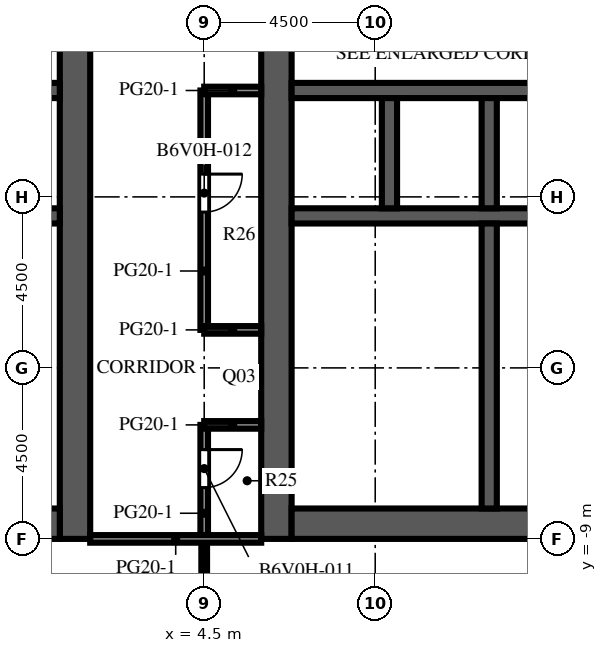
"""IFC4 building model, lengths in metres.
Left out: names, types, materials, properties, quantities, classifications, styles, units other than length and angle.
Written with IfcOpenShell. Run it as: python <this file> out.ifc"""

import sys

from ifc_helpers import new_model, si_unit, direction, frame, frame_2d, origin, place, context, subcontext, project, spatial, rectangle, extrude, element, fill, save


model = new_model("IFC4")
c1 = context("Model", 3, precision=1e-05, world=origin(), true_north=direction((0.0, 1.0)))
c2 = subcontext(c1, "Body", "Model", "MODEL_VIEW")
j1 = project(units=[si_unit("LENGTHUNIT", "METRE"), si_unit("PLANEANGLEUNIT", "RADIAN")], contexts=[c1])
p1 = place(None, origin())
s1 = spatial("IfcSite", under=j1, at=p1, CompositionType="ELEMENT")
p2 = place(p1, origin())
s2 = spatial("IfcBuilding", under=s1, at=p2, CompositionType="ELEMENT")
p3 = place(p2, frame((0.0, 0.0, 191.5)))
s3 = spatial("IfcBuildingStorey", under=s2, at=p3, CompositionType="ELEMENT", Elevation=191.5)
p4 = place(p3, frame((1.1, -9.0, 0.0), z_axis=(0.0, 0.0, 1.0), x_axis=(0.0, 1.0, 0.0)))
e1 = element("IfcWall", 1, at=p4, inside=s3, PredefinedType="SHEAR", context=c2, shape_type="SweptSolid", body=[
    extrude(rectangle(XDim=27.5, YDim=0.8, at=frame_2d((13.75, 0.0))), origin(), (0.0, 0.0, 1.0), 4.1),
])
p5 = place(p4, frame((12.55, 0.0, 0.0)))
e2 = element("IfcOpeningElement", 2, at=p5, cuts=e1, PredefinedType="OPENING", context=c2, shape_type="SweptSolid", body=[
    extrude(rectangle(XDim=2.4, YDim=2.4, at=frame_2d((1.2, 1.2))), frame((0.0, 0.41, 0.0), z_axis=(0.0, -1.0, 0.0), x_axis=(1.0, 0.0, 0.0)), (0.0, 0.0, 1.0), 0.82),
])
p6 = place(p4, frame((3.95, 0.0, 0.0)))
e3 = element("IfcOpeningElement", 3, at=p6, cuts=e1, PredefinedType="OPENING", context=c2, shape_type="SweptSolid", body=[
    extrude(rectangle(XDim=1.2, YDim=2.1, at=frame_2d((0.6, 1.05))), frame((0.0, 0.41, 0.0), z_axis=(0.0, -1.0, 0.0), x_axis=(1.0, 0.0, 0.0)), (0.0, 0.0, 1.0), 0.82),
])
p7 = place(p4, frame((19.45, 0.0, 0.0)))
e4 = element("IfcOpeningElement", 4, at=p7, cuts=e1, PredefinedType="OPENING", context=c2, shape_type="SweptSolid", body=[
    extrude(rectangle(XDim=1.0, YDim=2.1, at=frame_2d((0.5, 1.05))), frame((0.0, 0.41, 0.0), z_axis=(0.0, -1.0, 0.0), x_axis=(1.0, 0.0, 0.0)), (0.0, 0.0, 1.0), 0.82),
])
p8 = place(p4, frame((21.137, 0.0, 0.0)))
e5 = element("IfcOpeningElement", 5, at=p8, cuts=e1, PredefinedType="OPENING", context=c2, shape_type="SweptSolid", body=[
    extrude(rectangle(XDim=1.0, YDim=2.1, at=frame_2d((0.5, 1.05))), frame((0.0, 0.41, 0.0), z_axis=(0.0, -1.0, 0.0), x_axis=(1.0, 0.0, 0.0)), (0.0, 0.0, 1.0), 0.82),
])
p9 = place(p4, frame((23.2, 0.0, 0.0)))
e6 = element("IfcOpeningElement", 6, at=p9, cuts=e1, PredefinedType="OPENING", context=c2, shape_type="SweptSolid", body=[
    extrude(rectangle(XDim=1.0, YDim=2.1, at=frame_2d((0.5, 1.05))), frame((0.0, 0.41, 0.0), z_axis=(0.0, -1.0, 0.0), x_axis=(1.0, 0.0, 0.0)), (0.0, 0.0, 1.0), 0.82),
])
p10 = place(p4, frame((25.262, 0.0, 0.0)))
e7 = element("IfcOpeningElement", 7, at=p10, cuts=e1, PredefinedType="OPENING", context=c2, shape_type="SweptSolid", body=[
    extrude(rectangle(XDim=1.0, YDim=2.1, at=frame_2d((0.5, 1.05))), frame((0.0, 0.41, 0.0), z_axis=(0.0, -1.0, 0.0), x_axis=(1.0, 0.0, 0.0)), (0.0, 0.0, 1.0), 0.82),
])
p11 = place(p3, frame((-9.7, -8.6, 0.0), z_axis=(0.0, 0.0, 1.0), x_axis=(1.0, 0.0, 0.0)))
e8 = element("IfcWall", 8, at=p11, inside=s3, PredefinedType="SHEAR", context=c2, shape_type="SweptSolid", body=[
    extrude(rectangle(XDim=10.4, YDim=0.8, at=frame_2d((5.2, 0.0))), origin(), (0.0, 0.0, 1.0), 4.1),
])
p12 = place(p3, frame((-9.7, -0.5, 0.0), z_axis=(0.0, 0.0, 1.0), x_axis=(1.0, 0.0, 0.0)))
e9 = element("IfcWall", 9, at=p12, inside=s3, PredefinedType="SHEAR", context=c2, shape_type="SweptSolid", body=[
    extrude(rectangle(XDim=10.4, YDim=0.4, at=frame_2d((5.2, 0.0))), origin(), (0.0, 0.0, 1.0), 4.1),
])
p13 = place(p3, frame((-9.7, 2.8, 0.0), z_axis=(0.0, 0.0, 1.0), x_axis=(1.0, 0.0, 0.0)))
e10 = element("IfcWall", 10, at=p13, inside=s3, PredefinedType="SHEAR", context=c2, shape_type="SweptSolid", body=[
    extrude(rectangle(XDim=10.4, YDim=0.4, at=frame_2d((5.2, 0.0))), origin(), (0.0, 0.0, 1.0), 4.1),
])
p14 = place(p13, frame((0.738, 0.0, 0.0)))
e11 = element("IfcOpeningElement", 11, at=p14, cuts=e10, PredefinedType="OPENING", context=c2, shape_type="SweptSolid", body=[
    extrude(rectangle(XDim=1.1, YDim=2.1, at=frame_2d((0.55, 1.05))), frame((0.0, 0.21, 0.0), z_axis=(0.0, -1.0, 0.0), x_axis=(1.0, 0.0, 0.0)), (0.0, 0.0, 1.0), 0.42),
])
p15 = place(p13, frame((3.337, 0.0, 0.0)))
e12 = element("IfcOpeningElement", 12, at=p15, cuts=e10, PredefinedType="OPENING", context=c2, shape_type="SweptSolid", body=[
    extrude(rectangle(XDim=1.1, YDim=2.1, at=frame_2d((0.55, 1.05))), frame((0.0, 0.21, 0.0), z_axis=(0.0, -1.0, 0.0), x_axis=(1.0, 0.0, 0.0)), (0.0, 0.0, 1.0), 0.42),
])
p16 = place(p13, frame((6.012, 0.0, 0.0)))
e13 = element("IfcOpeningElement", 13, at=p16, cuts=e10, PredefinedType="OPENING", context=c2, shape_type="SweptSolid", body=[
    extrude(rectangle(XDim=1.0, YDim=2.1, at=frame_2d((0.5, 1.05))), frame((0.0, 0.21, 0.0), z_axis=(0.0, -1.0, 0.0), x_axis=(1.0, 0.0, 0.0)), (0.0, 0.0, 1.0), 0.42),
])
p17 = place(p13, frame((8.613, 0.0, 0.0)))
e14 = element("IfcOpeningElement", 14, at=p17, cuts=e10, PredefinedType="OPENING", context=c2, shape_type="SweptSolid", body=[
    extrude(rectangle(XDim=1.0, YDim=2.1, at=frame_2d((0.5, 1.05))), frame((0.0, 0.21, 0.0), z_axis=(0.0, -1.0, 0.0), x_axis=(1.0, 0.0, 0.0)), (0.0, 0.0, 1.0), 0.42),
])
p18 = place(p3, frame((6.4, -9.0, 0.0), z_axis=(0.0, 0.0, 1.0), x_axis=(0.0, 1.0, 0.0)))
e15 = element("IfcWall", 15, at=p18, inside=s3, PredefinedType="SHEAR", context=c2, shape_type="SweptSolid", body=[
    extrude(rectangle(XDim=27.5, YDim=0.8, at=frame_2d((13.75, 0.0))), origin(), (0.0, 0.0, 1.0), 4.1),
])
p19 = place(p18, frame((12.55, 0.0, 0.0)))
e16 = element("IfcOpeningElement", 16, at=p19, cuts=e15, PredefinedType="OPENING", context=c2, shape_type="SweptSolid", body=[
    extrude(rectangle(XDim=2.4, YDim=2.4, at=frame_2d((1.2, 1.2))), frame((0.0, 0.41, 0.0), z_axis=(0.0, -1.0, 0.0), x_axis=(1.0, 0.0, 0.0)), (0.0, 0.0, 1.0), 0.82),
])
p20 = place(p18, frame((3.95, 0.0, 0.0)))
e17 = element("IfcOpeningElement", 17, at=p20, cuts=e15, PredefinedType="OPENING", context=c2, shape_type="SweptSolid", body=[
    extrude(rectangle(XDim=1.2, YDim=2.1, at=frame_2d((0.6, 1.05))), frame((0.0, 0.41, 0.0), z_axis=(0.0, -1.0, 0.0), x_axis=(1.0, 0.0, 0.0)), (0.0, 0.0, 1.0), 0.82),
])
p21 = place(p18, frame((19.45, 0.0, 0.0)))
e18 = element("IfcOpeningElement", 18, at=p21, cuts=e15, PredefinedType="OPENING", context=c2, shape_type="SweptSolid", body=[
    extrude(rectangle(XDim=1.0, YDim=2.1, at=frame_2d((0.5, 1.05))), frame((0.0, 0.41, 0.0), z_axis=(0.0, -1.0, 0.0), x_axis=(1.0, 0.0, 0.0)), (0.0, 0.0, 1.0), 0.82),
])
p22 = place(p18, frame((21.137, 0.0, 0.0)))
e19 = element("IfcOpeningElement", 19, at=p22, cuts=e15, PredefinedType="OPENING", context=c2, shape_type="SweptSolid", body=[
    extrude(rectangle(XDim=1.0, YDim=2.1, at=frame_2d((0.5, 1.05))), frame((0.0, 0.41, 0.0), z_axis=(0.0, -1.0, 0.0), x_axis=(1.0, 0.0, 0.0)), (0.0, 0.0, 1.0), 0.82),
])
p23 = place(p18, frame((23.2, 0.0, 0.0)))
e20 = element("IfcOpeningElement", 20, at=p23, cuts=e15, PredefinedType="OPENING", context=c2, shape_type="SweptSolid", body=[
    extrude(rectangle(XDim=1.0, YDim=2.1, at=frame_2d((0.5, 1.05))), frame((0.0, 0.41, 0.0), z_axis=(0.0, -1.0, 0.0), x_axis=(1.0, 0.0, 0.0)), (0.0, 0.0, 1.0), 0.82),
])
p24 = place(p18, frame((25.262, 0.0, 0.0)))
e21 = element("IfcOpeningElement", 21, at=p24, cuts=e15, PredefinedType="OPENING", context=c2, shape_type="SweptSolid", body=[
    extrude(rectangle(XDim=1.0, YDim=2.1, at=frame_2d((0.5, 1.05))), frame((0.0, 0.41, 0.0), z_axis=(0.0, -1.0, 0.0), x_axis=(1.0, 0.0, 0.0)), (0.0, 0.0, 1.0), 0.82),
])
p25 = place(p3, frame((6.8, -8.6, 0.0), z_axis=(0.0, 0.0, 1.0), x_axis=(1.0, 0.0, 0.0)))
e22 = element("IfcWall", 22, at=p25, inside=s3, PredefinedType="SHEAR", context=c2, shape_type="SweptSolid", body=[
    extrude(rectangle(XDim=10.4, YDim=0.8, at=frame_2d((5.2, 0.0))), origin(), (0.0, 0.0, 1.0), 4.1),
])
p26 = place(p3, frame((6.8, -0.5, 0.0), z_axis=(0.0, 0.0, 1.0), x_axis=(1.0, 0.0, 0.0)))
e23 = element("IfcWall", 23, at=p26, inside=s3, PredefinedType="SHEAR", context=c2, shape_type="SweptSolid", body=[
    extrude(rectangle(XDim=10.4, YDim=0.4, at=frame_2d((5.2, 0.0))), origin(), (0.0, 0.0, 1.0), 4.1),
])
p27 = place(p3, frame((6.8, 2.8, 0.0), z_axis=(0.0, 0.0, 1.0), x_axis=(1.0, 0.0, 0.0)))
e24 = element("IfcWall", 24, at=p27, inside=s3, PredefinedType="SHEAR", context=c2, shape_type="SweptSolid", body=[
    extrude(rectangle(XDim=10.4, YDim=0.4, at=frame_2d((5.2, 0.0))), origin(), (0.0, 0.0, 1.0), 4.1),
])
p28 = place(p27, frame((0.738, 0.0, 0.0)))
e25 = element("IfcOpeningElement", 25, at=p28, cuts=e24, PredefinedType="OPENING", context=c2, shape_type="SweptSolid", body=[
    extrude(rectangle(XDim=1.1, YDim=2.1, at=frame_2d((0.55, 1.05))), frame((0.0, 0.21, 0.0), z_axis=(0.0, -1.0, 0.0), x_axis=(1.0, 0.0, 0.0)), (0.0, 0.0, 1.0), 0.42),
])
p29 = place(p27, frame((3.337, 0.0, 0.0)))
e26 = element("IfcOpeningElement", 26, at=p29, cuts=e24, PredefinedType="OPENING", context=c2, shape_type="SweptSolid", body=[
    extrude(rectangle(XDim=1.1, YDim=2.1, at=frame_2d((0.55, 1.05))), frame((0.0, 0.21, 0.0), z_axis=(0.0, -1.0, 0.0), x_axis=(1.0, 0.0, 0.0)), (0.0, 0.0, 1.0), 0.42),
])
p30 = place(p27, frame((6.012, 0.0, 0.0)))
e27 = element("IfcOpeningElement", 27, at=p30, cuts=e24, PredefinedType="OPENING", context=c2, shape_type="SweptSolid", body=[
    extrude(rectangle(XDim=1.0, YDim=2.1, at=frame_2d((0.5, 1.05))), frame((0.0, 0.21, 0.0), z_axis=(0.0, -1.0, 0.0), x_axis=(1.0, 0.0, 0.0)), (0.0, 0.0, 1.0), 0.42),
])
p31 = place(p27, frame((8.613, 0.0, 0.0)))
e28 = element("IfcOpeningElement", 28, at=p31, cuts=e24, PredefinedType="OPENING", context=c2, shape_type="SweptSolid", body=[
    extrude(rectangle(XDim=1.0, YDim=2.1, at=frame_2d((0.5, 1.05))), frame((0.0, 0.21, 0.0), z_axis=(0.0, -1.0, 0.0), x_axis=(1.0, 0.0, 0.0)), (0.0, 0.0, 1.0), 0.42),
])
for number, where, z_axis, x_axis in (
    (29, (9.375, -0.3, 0.0), (0.0, 0.0, 1.0), (0.0, 1.0, 0.0)),
    (30, (12.0, -0.3, 0.0), (0.0, 0.0, 1.0), (0.0, 1.0, 0.0)),
):
    element("IfcWall", number, at=place(p3, frame(where, z_axis=z_axis, x_axis=x_axis)), inside=s3, PredefinedType="SHEAR", context=c2, shape_type="SweptSolid", body=[
        extrude(rectangle(XDim=2.9, YDim=0.4, at=frame_2d((1.45, 0.0))), origin(), (0.0, 0.0, 1.0), 4.1),
    ])
p32 = place(p3, frame((12.0, -8.2, 0.0), z_axis=(0.0, 0.0, 1.0), x_axis=(0.0, 1.0, 0.0)))
e31 = element("IfcWall", 31, at=p32, inside=s3, PredefinedType="SHEAR", context=c2, shape_type="SweptSolid", body=[
    extrude(rectangle(XDim=7.5, YDim=0.4, at=frame_2d((3.75, 0.0))), origin(), (0.0, 0.0, 1.0), 4.1),
])
p33 = place(p3, frame((-0.9, -5.95, 0.0), z_axis=(0.0, 0.0, 1.0), x_axis=(1.0, 0.0, 0.0)))
e32 = element("IfcWall", 32, at=p33, inside=s3, PredefinedType="PARTITIONING", context=c2, shape_type="SweptSolid", body=[
    extrude(rectangle(XDim=1.6, YDim=0.1, at=frame_2d((0.8, 0.0))), origin(), (0.0, 0.0, 1.0), 3.65),
])
p34 = place(p33, frame((0.3, 0.0, 0.0)))
e33 = element("IfcOpeningElement", 33, at=p34, cuts=e32, PredefinedType="OPENING", context=c2, shape_type="SweptSolid", body=[
    extrude(rectangle(XDim=1.0, YDim=2.1, at=frame_2d((0.5, 1.05))), frame((0.0, 0.06, 0.0), z_axis=(0.0, -1.0, 0.0), x_axis=(1.0, 0.0, 0.0)), (0.0, 0.0, 1.0), 0.12),
])
p35 = place(p3, frame((-0.9, -2.95, 0.0), z_axis=(0.0, 0.0, 1.0), x_axis=(1.0, 0.0, 0.0)))
e34 = element("IfcWall", 34, at=p35, inside=s3, PredefinedType="PARTITIONING", context=c2, shape_type="SweptSolid", body=[
    extrude(rectangle(XDim=1.6, YDim=0.1, at=frame_2d((0.8, 0.0))), origin(), (0.0, 0.0, 1.0), 3.65),
])
p36 = place(p35, frame((0.3, 0.0, 0.0)))
e35 = element("IfcOpeningElement", 35, at=p36, cuts=e34, PredefinedType="OPENING", context=c2, shape_type="SweptSolid", body=[
    extrude(rectangle(XDim=1.0, YDim=2.1, at=frame_2d((0.5, 1.05))), frame((0.0, 0.06, 0.0), z_axis=(0.0, -1.0, 0.0), x_axis=(1.0, 0.0, 0.0)), (0.0, 0.0, 1.0), 0.12),
])
p37 = place(p3, frame((6.8, -5.95, 0.0), z_axis=(0.0, 0.0, 1.0), x_axis=(1.0, 0.0, 0.0)))
e36 = element("IfcWall", 36, at=p37, inside=s3, PredefinedType="PARTITIONING", context=c2, shape_type="SweptSolid", body=[
    extrude(rectangle(XDim=1.6, YDim=0.1, at=frame_2d((0.8, 0.0))), origin(), (0.0, 0.0, 1.0), 3.65),
])
p38 = place(p37, frame((0.3, 0.0, 0.0)))
e37 = element("IfcOpeningElement", 37, at=p38, cuts=e36, PredefinedType="OPENING", context=c2, shape_type="SweptSolid", body=[
    extrude(rectangle(XDim=1.0, YDim=2.1, at=frame_2d((0.5, 1.05))), frame((0.0, 0.06, 0.0), z_axis=(0.0, -1.0, 0.0), x_axis=(1.0, 0.0, 0.0)), (0.0, 0.0, 1.0), 0.12),
])
p39 = place(p3, frame((6.8, -2.95, 0.0), z_axis=(0.0, 0.0, 1.0), x_axis=(1.0, 0.0, 0.0)))
e38 = element("IfcWall", 38, at=p39, inside=s3, PredefinedType="PARTITIONING", context=c2, shape_type="SweptSolid", body=[
    extrude(rectangle(XDim=1.6, YDim=0.1, at=frame_2d((0.8, 0.0))), origin(), (0.0, 0.0, 1.0), 3.65),
])
p40 = place(p39, frame((0.3, 0.0, 0.0)))
e39 = element("IfcOpeningElement", 39, at=p40, cuts=e38, PredefinedType="OPENING", context=c2, shape_type="SweptSolid", body=[
    extrude(rectangle(XDim=1.0, YDim=2.1, at=frame_2d((0.5, 1.05))), frame((0.0, 0.06, 0.0), z_axis=(0.0, -1.0, 0.0), x_axis=(1.0, 0.0, 0.0)), (0.0, 0.0, 1.0), 0.12),
])
p41 = place(p3, frame((8.4, -5.95, 0.0), z_axis=(0.0, 0.0, 1.0), x_axis=(0.0, 1.0, 0.0)))
e40 = element("IfcWall", 40, at=p41, inside=s3, PredefinedType="PARTITIONING", context=c2, shape_type="SweptSolid", body=[
    extrude(rectangle(XDim=3.0, YDim=0.1, at=frame_2d((1.5, 0.0))), origin(), (0.0, 0.0, 1.0), 3.65),
])
p42 = place(p41, frame((1.0, 0.0, 0.0)))
e41 = element("IfcOpeningElement", 41, at=p42, cuts=e40, PredefinedType="OPENING", context=c2, shape_type="SweptSolid", body=[
    extrude(rectangle(XDim=1.0, YDim=2.1, at=frame_2d((0.5, 1.05))), frame((0.0, 0.06, 0.0), z_axis=(0.0, -1.0, 0.0), x_axis=(1.0, 0.0, 0.0)), (0.0, 0.0, 1.0), 0.12),
])
for number, where, z_axis, x_axis in (
    (42, (8.4, -5.95, 0.0), (0.0, 0.0, 1.0), (1.0, 0.0, 0.0)),
    (43, (8.4, -2.95, 0.0), (0.0, 0.0, 1.0), (1.0, 0.0, 0.0)),
):
    element("IfcWall", number, at=place(p3, frame(where, z_axis=z_axis, x_axis=x_axis)), inside=s3, PredefinedType="PARTITIONING", context=c2, shape_type="SweptSolid", body=[
        extrude(rectangle(XDim=3.4, YDim=0.1, at=frame_2d((1.7, 0.0))), origin(), (0.0, 0.0, 1.0), 3.65),
    ])
p43 = place(p3, frame((4.5, -9.0, 0.0), z_axis=(0.0, 0.0, 1.0), x_axis=(0.0, -1.0, 0.0)))
e44 = element("IfcWall", 44, at=p43, inside=s3, PredefinedType="PARTITIONING", context=c2, shape_type="SweptSolid", body=[
    extrude(rectangle(XDim=17.5, YDim=0.15, at=frame_2d((8.75, 0.0))), origin(), (0.0, 0.0, 1.0), 3.65),
])
p44 = place(p43, frame((3.9, 0.0, 0.0)))
e45 = element("IfcOpeningElement", 45, at=p44, cuts=e44, PredefinedType="OPENING", context=c2, shape_type="SweptSolid", body=[
    extrude(rectangle(XDim=1.0, YDim=2.1, at=frame_2d((0.5, 1.05))), frame((0.0, 0.085, 0.0), z_axis=(0.0, -1.0, 0.0), x_axis=(1.0, 0.0, 0.0)), (0.0, 0.0, 1.0), 0.17),
])
p45 = place(p3, frame((4.5, -6.0, 0.0), z_axis=(0.0, 0.0, 1.0), x_axis=(0.0, -1.0, 0.0)))
e46 = element("IfcWall", 46, at=p45, inside=s3, PredefinedType="PARTITIONING", context=c2, shape_type="SweptSolid", body=[
    extrude(rectangle(XDim=3.0, YDim=0.2, at=frame_2d((1.5, 0.0))), origin(), (0.0, 0.0, 1.0), 3.65),
])
p46 = place(p45, frame((0.65, 0.0, 0.0)))
e47 = element("IfcOpeningElement", 47, at=p46, cuts=e46, PredefinedType="OPENING", context=c2, shape_type="SweptSolid", body=[
    extrude(rectangle(XDim=1.0, YDim=2.1, at=frame_2d((0.5, 1.05))), frame((0.0, 0.11, 0.0), z_axis=(0.0, -1.0, 0.0), x_axis=(1.0, 0.0, 0.0)), (0.0, 0.0, 1.0), 0.22),
])
p47 = place(p3, frame((4.5, 2.8, 0.0), z_axis=(0.0, 0.0, 1.0), x_axis=(0.0, -1.0, 0.0)))
e48 = element("IfcWall", 48, at=p47, inside=s3, PredefinedType="PARTITIONING", context=c2, shape_type="SweptSolid", body=[
    extrude(rectangle(XDim=6.3, YDim=0.2, at=frame_2d((3.15, 0.0))), origin(), (0.0, 0.0, 1.0), 3.65),
])
p48 = place(p47, frame((2.2, 0.0, 0.0)))
e49 = element("IfcOpeningElement", 49, at=p48, cuts=e48, PredefinedType="OPENING", context=c2, shape_type="SweptSolid", body=[
    extrude(rectangle(XDim=1.0, YDim=2.1, at=frame_2d((0.5, 1.05))), frame((0.0, 0.11, 0.0), z_axis=(0.0, -1.0, 0.0), x_axis=(1.0, 0.0, 0.0)), (0.0, 0.0, 1.0), 0.22),
])
p49 = place(p3, frame((1.5, -9.0, 0.0), z_axis=(0.0, 0.0, 1.0), x_axis=(1.0, 0.0, 0.0)))
e50 = element("IfcWall", 50, at=p49, inside=s3, PredefinedType="PARTITIONING", context=c2, shape_type="SweptSolid", body=[
    extrude(rectangle(XDim=4.5, YDim=0.2, at=frame_2d((2.25, 0.0))), origin(), (0.0, 0.0, 1.0), 3.65),
])
for number, where, z_axis, x_axis in (
    (51, (4.5, -6.0, 0.0), (0.0, 0.0, 1.0), (1.0, 0.0, 0.0)),
    (52, (4.5, -3.5, 0.0), (0.0, 0.0, 1.0), (1.0, 0.0, 0.0)),
    (53, (4.5, 2.8, 0.0), (0.0, 0.0, 1.0), (1.0, 0.0, 0.0)),
):
    element("IfcWall", number, at=place(p3, frame(where, z_axis=z_axis, x_axis=x_axis)), inside=s3, PredefinedType="PARTITIONING", context=c2, shape_type="SweptSolid", body=[
        extrude(rectangle(XDim=1.5, YDim=0.2, at=frame_2d((0.75, 0.0))), origin(), (0.0, 0.0, 1.0), 3.65),
    ])
p50 = place(p28, origin())
e54 = element("IfcDoor", 54, at=p50, inside=s3, OperationType="DOUBLE_DOOR_SLIDING", PredefinedType="DOOR", context=c2, shape_type="SweptSolid", body=[
    extrude(rectangle(XDim=1.1, YDim=2.1, at=frame_2d((0.55, 1.05))), frame((0.0, 0.025, 0.0), z_axis=(0.0, -1.0, 0.0), x_axis=(1.0, 0.0, 0.0)), (0.0, 0.0, 1.0), 0.05),
])
fill(e25, e54)
p51 = place(p29, origin())
e55 = element("IfcDoor", 55, at=p51, inside=s3, OperationType="DOUBLE_DOOR_SLIDING", PredefinedType="DOOR", context=c2, shape_type="SweptSolid", body=[
    extrude(rectangle(XDim=1.1, YDim=2.1, at=frame_2d((0.55, 1.05))), frame((0.0, 0.025, 0.0), z_axis=(0.0, -1.0, 0.0), x_axis=(1.0, 0.0, 0.0)), (0.0, 0.0, 1.0), 0.05),
])
fill(e26, e55)
p52 = place(p5, origin())
e56 = element("IfcDoor", 56, at=p52, inside=s3, OperationType="DOUBLE_DOOR_DOUBLE_SWING", PredefinedType="DOOR", context=c2, shape_type="SweptSolid", body=[
    extrude(rectangle(XDim=2.4, YDim=2.4, at=frame_2d((1.2, 1.2))), frame((0.0, 0.025, 0.0), z_axis=(0.0, -1.0, 0.0), x_axis=(1.0, 0.0, 0.0)), (0.0, 0.0, 1.0), 0.05),
])
fill(e2, e56)
p53 = place(p19, origin())
e57 = element("IfcDoor", 57, at=p53, inside=s3, OperationType="DOUBLE_DOOR_DOUBLE_SWING", PredefinedType="DOOR", context=c2, shape_type="SweptSolid", body=[
    extrude(rectangle(XDim=2.4, YDim=2.4, at=frame_2d((1.2, 1.2))), frame((0.0, 0.025, 0.0), z_axis=(0.0, -1.0, 0.0), x_axis=(1.0, 0.0, 0.0)), (0.0, 0.0, 1.0), 0.05),
])
fill(e16, e57)
p54 = place(p6, origin())
e58 = element("IfcDoor", 58, at=p54, inside=s3, OperationType="SINGLE_SWING_LEFT", PredefinedType="DOOR", context=c2, shape_type="SweptSolid", body=[
    extrude(rectangle(XDim=1.2, YDim=2.1, at=frame_2d((0.6, 1.05))), frame((0.0, 0.375, 0.0), z_axis=(0.0, -1.0, 0.0), x_axis=(1.0, 0.0, 0.0)), (0.0, 0.0, 1.0), 0.05),
])
fill(e3, e58)
p55 = place(p30, origin())
e59 = element("IfcDoor", 59, at=p55, inside=s3, OperationType="SINGLE_SWING_LEFT", PredefinedType="DOOR", context=c2, shape_type="SweptSolid", body=[
    extrude(rectangle(XDim=1.0, YDim=2.1, at=frame_2d((0.5, 1.05))), frame((0.0, 0.025, 0.0), z_axis=(0.0, -1.0, 0.0), x_axis=(1.0, 0.0, 0.0)), (0.0, 0.0, 1.0), 0.05),
])
fill(e27, e59)
p56 = place(p20, origin())
e60 = element("IfcDoor", 60, at=p56, inside=s3, OperationType="SINGLE_SWING_RIGHT", PredefinedType="DOOR", context=c2, shape_type="SweptSolid", body=[
    extrude(rectangle(XDim=1.2, YDim=2.1, at=frame_2d((0.6, 1.05))), frame((0.0, -0.325, 0.0), z_axis=(0.0, -1.0, 0.0), x_axis=(1.0, 0.0, 0.0)), (0.0, 0.0, 1.0), 0.05),
])
fill(e17, e60)
p57 = place(p38, origin())
e61 = element("IfcDoor", 61, at=p57, inside=s3, OperationType="SINGLE_SWING_LEFT", PredefinedType="DOOR", context=c2, shape_type="SweptSolid", body=[
    extrude(rectangle(XDim=1.0, YDim=2.1, at=frame_2d((0.5, 1.05))), frame((0.0, 0.025, 0.0), z_axis=(0.0, -1.0, 0.0), x_axis=(1.0, 0.0, 0.0)), (0.0, 0.0, 1.0), 0.05),
])
fill(e37, e61)
p58 = place(p40, origin())
e62 = element("IfcDoor", 62, at=p58, inside=s3, OperationType="SINGLE_SWING_RIGHT", PredefinedType="DOOR", context=c2, shape_type="SweptSolid", body=[
    extrude(rectangle(XDim=1.0, YDim=2.1, at=frame_2d((0.5, 1.05))), frame((0.0, 0.025, 0.0), z_axis=(0.0, -1.0, 0.0), x_axis=(1.0, 0.0, 0.0)), (0.0, 0.0, 1.0), 0.05),
])
fill(e39, e62)
p59 = place(p42, origin())
e63 = element("IfcDoor", 63, at=p59, inside=s3, OperationType="SINGLE_SWING_LEFT", PredefinedType="DOOR", context=c2, shape_type="SweptSolid", body=[
    extrude(rectangle(XDim=1.0, YDim=2.1, at=frame_2d((0.5, 1.05))), frame((0.0, 0.025, 0.0), z_axis=(0.0, -1.0, 0.0), x_axis=(1.0, 0.0, 0.0)), (0.0, 0.0, 1.0), 0.05),
])
fill(e41, e63)
p60 = place(p46, origin())
e64 = element("IfcDoor", 64, at=p60, inside=s3, OperationType="SINGLE_SWING_LEFT", PredefinedType="DOOR", context=c2, shape_type="SweptSolid", body=[
    extrude(rectangle(XDim=1.0, YDim=2.1, at=frame_2d((0.5, 1.05))), frame((0.0, 0.025, 0.0), z_axis=(0.0, -1.0, 0.0), x_axis=(1.0, 0.0, 0.0)), (0.0, 0.0, 1.0), 0.05),
])
fill(e47, e64)
p61 = place(p48, origin())
e65 = element("IfcDoor", 65, at=p61, inside=s3, OperationType="SINGLE_SWING_LEFT", PredefinedType="DOOR", context=c2, shape_type="SweptSolid", body=[
    extrude(rectangle(XDim=1.0, YDim=2.1, at=frame_2d((0.5, 1.05))), frame((0.0, 0.025, 0.0), z_axis=(0.0, -1.0, 0.0), x_axis=(1.0, 0.0, 0.0)), (0.0, 0.0, 1.0), 0.05),
])
fill(e49, e65)
save(model, sys.argv[1])
